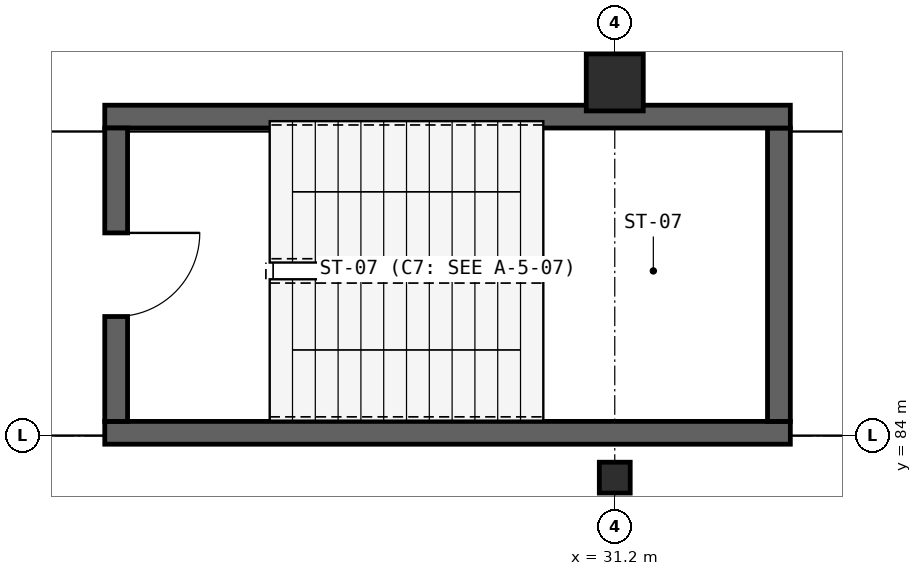
"""IFC4 building model, lengths in metres.
Left out: names, types, materials, properties, quantities, classifications, styles, units other than length and angle.
Written with IfcOpenShell. Run it as: python <this file> out.ifc"""

import sys

from ifc_helpers import new_model, si_unit, direction, frame, frame_2d, origin, origin_2d, place, context, subcontext, project, spatial, rectangle, hollow_circle, extrude, element, fill, save


model = new_model("IFC4")
c1 = context("Model", 3, precision=1e-05, world=origin(), true_north=direction((0.0, 1.0)))
c2 = subcontext(c1, "Body", "Model", "MODEL_VIEW")
j1 = project(units=[si_unit("LENGTHUNIT", "METRE"), si_unit("PLANEANGLEUNIT", "RADIAN")], contexts=[c1])
p1 = place(None, origin())
s1 = spatial("IfcSite", under=j1, at=p1, CompositionType="ELEMENT")
p2 = place(p1, origin())
s2 = spatial("IfcBuilding", under=s1, at=p2, CompositionType="ELEMENT")
p3 = place(p2, frame((0.0, 0.0, 10.2)))
s3 = spatial("IfcBuildingStorey", under=s2, at=p3, CompositionType="ELEMENT", Elevation=10.2)
p4 = place(p3, frame((31.2, 83.45, 0.0), z_axis=(0.0, 0.0, 1.0), x_axis=(1.0, 0.0, 0.0)))
e1 = element("IfcColumn", 1, at=p4, inside=s3, PredefinedType="COLUMN", context=c2, shape_type="SweptSolid", body=[
    extrude(hollow_circle(Radius=0.203, WallThickness=0.016, at=origin_2d()), origin(), (0.0, 0.0, 1.0), 4.8),
])
p5 = place(p3, frame((31.2, 88.65, 0.0), z_axis=(0.0, 0.0, 1.0), x_axis=(1.0, 0.0, 0.0)))
e2 = element("IfcColumn", 2, at=p5, inside=s3, PredefinedType="COLUMN", context=c2, shape_type="SweptSolid", body=[
    extrude(rectangle(XDim=0.75, YDim=0.75, at=origin_2d()), origin(), (0.0, 0.0, 1.0), 4.8),
])
p6 = place(p3, frame((24.49, 84.04, 0.0), z_axis=(0.0, 0.0, 1.0), x_axis=(1.0, 0.0, 0.0)))
e3 = element("IfcWall", 3, at=p6, inside=s3, PredefinedType="SHEAR", context=c2, shape_type="SweptSolid", body=[
    extrude(rectangle(XDim=9.02, YDim=0.3, at=frame_2d((4.51, 0.0))), origin(), (0.0, 0.0, 1.0), 4.46),
])
p7 = place(p3, frame((33.36, 84.19, 0.0), z_axis=(0.0, 0.0, 1.0), x_axis=(0.0, 1.0, 0.0)))
e4 = element("IfcWall", 4, at=p7, inside=s3, PredefinedType="SHEAR", context=c2, shape_type="SweptSolid", body=[
    extrude(rectangle(XDim=3.86, YDim=0.3, at=frame_2d((1.93, 0.0))), origin(), (0.0, 0.0, 1.0), 4.46),
])
p8 = place(p3, frame((33.51, 88.2, 0.0), z_axis=(0.0, 0.0, 1.0), x_axis=(-1.0, 0.0, 0.0)))
e5 = element("IfcWall", 5, at=p8, inside=s3, PredefinedType="SHEAR", context=c2, shape_type="SweptSolid", body=[
    extrude(rectangle(XDim=9.02, YDim=0.3, at=frame_2d((4.51, 0.0))), origin(), (0.0, 0.0, 1.0), 4.46),
])
p9 = place(p3, frame((24.64, 88.05, 0.0), z_axis=(0.0, 0.0, 1.0), x_axis=(0.0, -1.0, 0.0)))
e6 = element("IfcWall", 6, at=p9, inside=s3, PredefinedType="SHEAR", context=c2, shape_type="SweptSolid", body=[
    extrude(rectangle(XDim=3.86, YDim=0.3, at=frame_2d((1.93, 0.0))), origin(), (0.0, 0.0, 1.0), 4.46),
])
p10 = place(p9, frame((1.38, 0.0, 0.0)))
e7 = element("IfcOpeningElement", 7, at=p10, cuts=e6, PredefinedType="OPENING", context=c2, shape_type="SweptSolid", body=[
    extrude(rectangle(XDim=1.1, YDim=2.15, at=frame_2d((0.55, 1.075))), frame((0.0, 0.16, 0.0), z_axis=(0.0, -1.0, 0.0), x_axis=(1.0, 0.0, 0.0)), (0.0, 0.0, 1.0), 0.32),
])
p11 = place(p10, origin())
e8 = element("IfcDoor", 8, at=p11, inside=s3, OperationType="SINGLE_SWING_LEFT", PredefinedType="DOOR", context=c2, shape_type="SweptSolid", body=[
    extrude(rectangle(XDim=1.1, YDim=2.15, at=frame_2d((0.55, 1.075))), frame((0.0, 0.025, 0.0), z_axis=(0.0, -1.0, 0.0), x_axis=(1.0, 0.0, 0.0)), (0.0, 0.0, 1.0), 0.05),
])
fill(e7, e8)
save(model, sys.argv[1])
